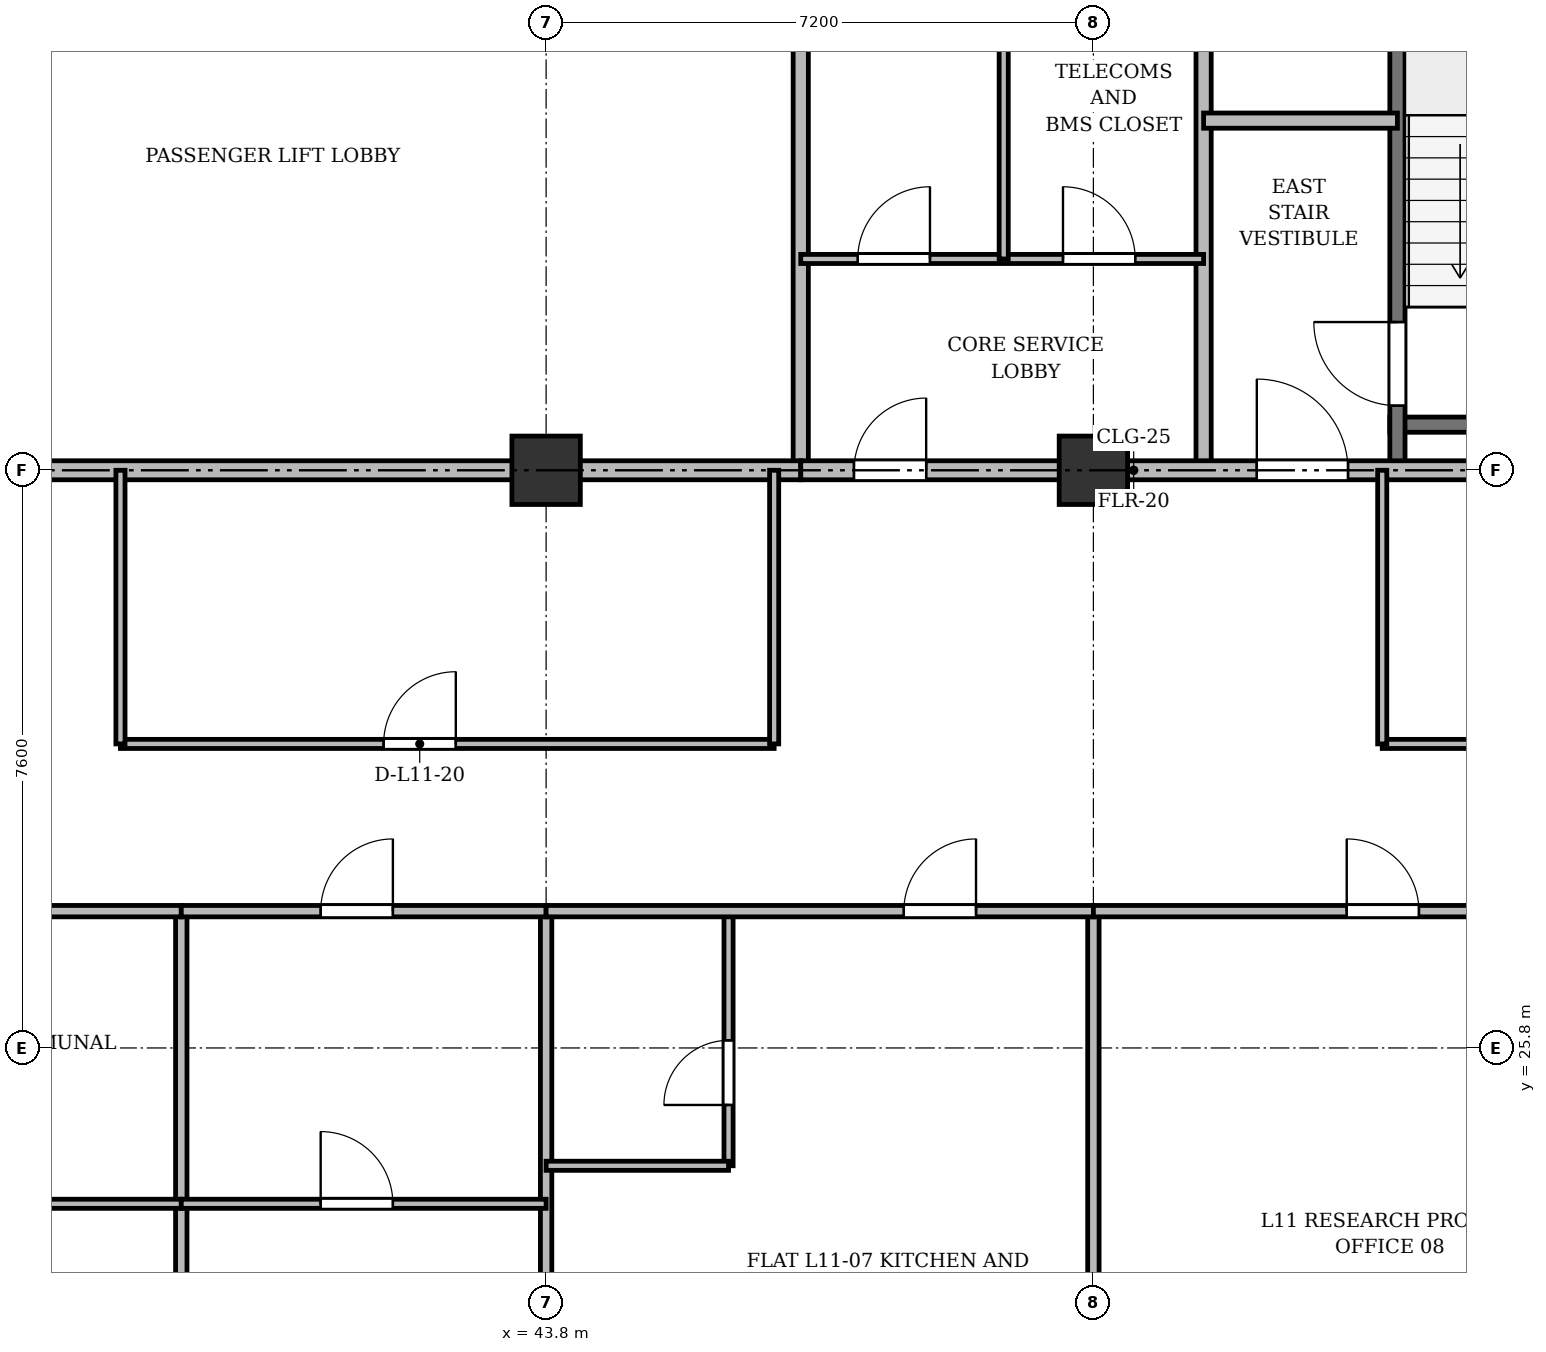
"""IFC4 building model, lengths in metres.
Left out: names, types, materials, properties, quantities, classifications, styles, units other than length and angle.
Written with IfcOpenShell. Run it as: python <this file> out.ifc"""

import sys

from ifc_helpers import new_model, si_unit, direction, frame, frame_2d, origin, origin_2d, place, context, subcontext, project, spatial, rectangle, extrude, source, transform, mapped, element, fill, save


model = new_model("IFC4")
c1 = context("Model", 3, precision=1e-05, world=origin(), true_north=direction((0.0, 1.0)))
c2 = subcontext(c1, "Body", "Model", "MODEL_VIEW")
j1 = project(units=[si_unit("LENGTHUNIT", "METRE"), si_unit("PLANEANGLEUNIT", "RADIAN")], contexts=[c1])
p1 = place(None, origin())
s1 = spatial("IfcSite", under=j1, at=p1, CompositionType="ELEMENT")
p2 = place(p1, origin())
s2 = spatial("IfcBuilding", under=s1, at=p2, CompositionType="ELEMENT")
p3 = place(p2, frame((0.0, 0.0, 45.1)))
s3 = spatial("IfcBuildingStorey", under=s2, at=p3, CompositionType="ELEMENT", Elevation=45.1)
m1 = source(origin(), c2, "Body", "SweptSolid", [
    extrude(rectangle(XDim=0.9, YDim=0.9, at=origin_2d()), origin(), (0.0, 0.0, 1.0), 3.6),
])
for number, where, z_axis, x_axis in (
    (1, (43.8, 33.4, 0.0), (0.0, 0.0, 1.0), (1.0, 0.0, 0.0)),
    (2, (51.0, 33.4, 0.0), (0.0, 0.0, 1.0), (1.0, 0.0, 0.0)),
):
    element("IfcColumn", number, at=place(p3, frame(where, z_axis=z_axis, x_axis=x_axis)), inside=s3, PredefinedType="COLUMN", context=c2, shape_type="MappedRepresentation", body=[
        mapped(m1, transform((0.0, 0.0, 0.0), x_axis=(1.0, 0.0, 0.0), y_axis=(0.0, 1.0, 0.0), z_axis=(0.0, 0.0, 1.0), scale=1.0)),
    ])
p4 = place(p3, frame((54.9, 34.0, 0.0), z_axis=(0.0, 0.0, 1.0), x_axis=(1.0, 0.0, 0.0)))
e3 = element("IfcWall", 3, at=p4, inside=s3, PredefinedType="SHEAR", context=c2, shape_type="SweptSolid", body=[
    extrude(rectangle(XDim=3.4, YDim=0.2, at=frame_2d((1.7, 0.0))), origin(), (0.0, 0.0, 1.0), 3.34),
])
p5 = place(p3, frame((55.0, 33.4, 0.0), z_axis=(0.0, 0.0, 1.0), x_axis=(0.0, 1.0, 0.0)))
e4 = element("IfcWall", 4, at=p5, inside=s3, PredefinedType="SHEAR", context=c2, shape_type="SweptSolid", body=[
    extrude(rectangle(XDim=11.1, YDim=0.2, at=frame_2d((5.55, 0.0))), origin(), (0.0, 0.0, 1.0), 3.34),
])
p6 = place(p5, frame((0.85, 0.0, 0.0)))
e5 = element("IfcOpeningElement", 5, at=p6, cuts=e4, PredefinedType="OPENING", context=c2, shape_type="SweptSolid", body=[
    extrude(rectangle(XDim=1.1, YDim=2.15, at=frame_2d((0.55, 1.075))), frame((0.0, 0.11, 0.0), z_axis=(0.0, -1.0, 0.0), x_axis=(1.0, 0.0, 0.0)), (0.0, 0.0, 1.0), 0.22),
])
p7 = place(p3, frame((47.15, 33.4, 0.0), z_axis=(0.0, 0.0, 1.0), x_axis=(0.0, 1.0, 0.0)))
e6 = element("IfcWall", 6, at=p7, inside=s3, PredefinedType="SOLIDWALL", context=c2, shape_type="SweptSolid", body=[
    extrude(rectangle(XDim=11.3, YDim=0.2, at=frame_2d((5.65, 0.0))), origin(), (0.0, 0.0, 1.0), 2.69),
])
p8 = place(p3, frame((26.3, 33.4, 0.0), z_axis=(0.0, 0.0, 1.0), x_axis=(1.0, 0.0, 0.0)))
e7 = element("IfcWall", 7, at=p8, inside=s3, PredefinedType="PARTITIONING", context=c2, shape_type="SweptSolid", body=[
    extrude(rectangle(XDim=20.85, YDim=0.25, at=frame_2d((10.425, 0.0))), origin(), (0.0, 0.0, 1.0), 2.69),
])
p9 = place(p8, frame((9.2, 0.0, 0.0)))
e8 = element("IfcOpeningElement", 8, at=p9, cuts=e7, PredefinedType="OPENING", context=c2, shape_type="SweptSolid", body=[
    extrude(rectangle(XDim=1.6, YDim=2.2, at=frame_2d((0.8, 1.1))), frame((0.0, 0.135, 0.0), z_axis=(0.0, -1.0, 0.0), x_axis=(1.0, 0.0, 0.0)), (0.0, 0.0, 1.0), 0.27),
])
p10 = place(p3, frame((52.45, 33.4, 0.0), z_axis=(0.0, 0.0, 1.0), x_axis=(0.0, 1.0, 0.0)))
e9 = element("IfcWall", 9, at=p10, inside=s3, PredefinedType="PARTITIONING", context=c2, shape_type="SweptSolid", body=[
    extrude(rectangle(XDim=8.65, YDim=0.2, at=frame_2d((4.325, 0.0))), origin(), (0.0, 0.0, 1.0), 2.69),
])
p11 = place(p10, frame((6.2, 0.0, 0.0)))
e10 = element("IfcOpeningElement", 10, at=p11, cuts=e9, PredefinedType="OPENING", context=c2, shape_type="SweptSolid", body=[
    extrude(rectangle(XDim=0.95, YDim=2.15, at=frame_2d((0.475, 1.075))), frame((0.0, 0.11, 0.0), z_axis=(0.0, -1.0, 0.0), x_axis=(1.0, 0.0, 0.0)), (0.0, 0.0, 1.0), 0.22),
])
p12 = place(p3, frame((52.45, 38.0, 0.0), z_axis=(0.0, 0.0, 1.0), x_axis=(1.0, 0.0, 0.0)))
e11 = element("IfcWall", 11, at=p12, inside=s3, PredefinedType="PARTITIONING", context=c2, shape_type="SweptSolid", body=[
    extrude(rectangle(XDim=2.55, YDim=0.2, at=frame_2d((1.275, 0.0))), origin(), (0.0, 0.0, 1.0), 3.34),
])
p13 = place(p3, frame((47.15, 36.18, 0.0), z_axis=(0.0, 0.0, 1.0), x_axis=(1.0, 0.0, 0.0)))
e12 = element("IfcWall", 12, at=p13, inside=s3, PredefinedType="PARTITIONING", context=c2, shape_type="SweptSolid", body=[
    extrude(rectangle(XDim=5.3, YDim=0.12, at=frame_2d((2.65, 0.0))), origin(), (0.0, 0.0, 1.0), 2.752),
])
p14 = place(p13, frame((0.75, 0.0, 0.0)))
e13 = element("IfcOpeningElement", 13, at=p14, cuts=e12, PredefinedType="OPENING", context=c2, shape_type="SweptSolid", body=[
    extrude(rectangle(XDim=0.95, YDim=2.15, at=frame_2d((0.475, 1.075))), frame((0.0, 0.07, 0.0), z_axis=(0.0, -1.0, 0.0), x_axis=(1.0, 0.0, 0.0)), (0.0, 0.0, 1.0), 0.14),
])
p15 = place(p13, frame((3.45, 0.0, 0.0)))
e14 = element("IfcOpeningElement", 14, at=p15, cuts=e12, PredefinedType="OPENING", context=c2, shape_type="SweptSolid", body=[
    extrude(rectangle(XDim=0.95, YDim=2.15, at=frame_2d((0.475, 1.075))), frame((0.0, 0.07, 0.0), z_axis=(0.0, -1.0, 0.0), x_axis=(1.0, 0.0, 0.0)), (0.0, 0.0, 1.0), 0.14),
])
p16 = place(p3, frame((49.82, 36.18, 0.0), z_axis=(0.0, 0.0, 1.0), x_axis=(0.0, 1.0, 0.0)))
e15 = element("IfcWall", 15, at=p16, inside=s3, PredefinedType="PARTITIONING", context=c2, shape_type="SweptSolid", body=[
    extrude(rectangle(XDim=5.82, YDim=0.12, at=frame_2d((2.91, 0.0))), origin(), (0.0, 0.0, 1.0), 3.34),
])
p17 = place(p3, frame((47.15, 33.4, 0.0), z_axis=(0.0, 0.0, 1.0), x_axis=(1.0, 0.0, 0.0)))
e16 = element("IfcWall", 16, at=p17, inside=s3, PredefinedType="PARTITIONING", context=c2, shape_type="SweptSolid", body=[
    extrude(rectangle(XDim=11.15, YDim=0.25, at=frame_2d((5.575, 0.0))), origin(), (0.0, 0.0, 1.0), 2.69),
])
p18 = place(p17, frame((0.7, 0.0, 0.0)))
e17 = element("IfcOpeningElement", 17, at=p18, cuts=e16, PredefinedType="OPENING", context=c2, shape_type="SweptSolid", body=[
    extrude(rectangle(XDim=0.95, YDim=2.15, at=frame_2d((0.475, 1.075))), frame((0.0, 0.135, 0.0), z_axis=(0.0, -1.0, 0.0), x_axis=(1.0, 0.0, 0.0)), (0.0, 0.0, 1.0), 0.27),
])
p19 = place(p17, frame((6.0, 0.0, 0.0)))
e18 = element("IfcOpeningElement", 18, at=p19, cuts=e16, PredefinedType="OPENING", context=c2, shape_type="SweptSolid", body=[
    extrude(rectangle(XDim=1.2, YDim=2.15, at=frame_2d((0.6, 1.075))), frame((0.0, 0.135, 0.0), z_axis=(0.0, -1.0, 0.0), x_axis=(1.0, 0.0, 0.0)), (0.0, 0.0, 1.0), 0.27),
])
p20 = place(p3, frame((38.2, 29.8, 0.0), z_axis=(0.0, 0.0, 1.0), x_axis=(1.0, 0.0, 0.0)))
e19 = element("IfcWall", 19, at=p20, inside=s3, PredefinedType="PARTITIONING", context=c2, shape_type="SweptSolid", body=[
    extrude(rectangle(XDim=8.6, YDim=0.12, at=frame_2d((4.3, 0.0))), origin(), (0.0, 0.0, 1.0), 2.752),
])
p21 = place(p20, frame((3.462, 0.0, 0.0)))
e20 = element("IfcOpeningElement", 20, at=p21, cuts=e19, PredefinedType="OPENING", context=c2, shape_type="SweptSolid", body=[
    extrude(rectangle(XDim=0.95, YDim=2.15, at=frame_2d((0.475, 1.075))), frame((0.0, 0.07, 0.0), z_axis=(0.0, -1.0, 0.0), x_axis=(1.0, 0.0, 0.0)), (0.0, 0.0, 1.0), 0.14),
])
p22 = place(p3, frame((54.8, 29.8, 0.0), z_axis=(0.0, 0.0, 1.0), x_axis=(1.0, 0.0, 0.0)))
e21 = element("IfcWall", 21, at=p22, inside=s3, PredefinedType="PARTITIONING", context=c2, shape_type="SweptSolid", body=[
    extrude(rectangle(XDim=14.85, YDim=0.12, at=frame_2d((7.425, 0.0))), origin(), (0.0, 0.0, 1.0), 2.752),
])
p23 = place(p22, frame((2.5, 0.0, 0.0)))
e22 = element("IfcOpeningElement", 22, at=p23, cuts=e21, PredefinedType="OPENING", context=c2, shape_type="SweptSolid", body=[
    extrude(rectangle(XDim=0.95, YDim=2.15, at=frame_2d((0.475, 1.075))), frame((0.0, 0.07, 0.0), z_axis=(0.0, -1.0, 0.0), x_axis=(1.0, 0.0, 0.0)), (0.0, 0.0, 1.0), 0.14),
])
p24 = place(p22, frame((9.2, 0.0, 0.0)))
e23 = element("IfcOpeningElement", 23, at=p24, cuts=e21, PredefinedType="OPENING", context=c2, shape_type="SweptSolid", body=[
    extrude(rectangle(XDim=0.95, YDim=2.15, at=frame_2d((0.475, 1.075))), frame((0.0, 0.07, 0.0), z_axis=(0.0, -1.0, 0.0), x_axis=(1.0, 0.0, 0.0)), (0.0, 0.0, 1.0), 0.14),
])
for number, where, z_axis, x_axis in (
    (24, (38.2, 29.8, 0.0), (0.0, 0.0, 1.0), (0.0, 1.0, 0.0)),
    (25, (46.8, 29.8, 0.0), (0.0, 0.0, 1.0), (0.0, 1.0, 0.0)),
    (26, (54.8, 29.8, 0.0), (0.0, 0.0, 1.0), (0.0, 1.0, 0.0)),
):
    element("IfcWall", number, at=place(p3, frame(where, z_axis=z_axis, x_axis=x_axis)), inside=s3, PredefinedType="PARTITIONING", context=c2, shape_type="SweptSolid", body=[
        extrude(rectangle(XDim=3.6, YDim=0.12, at=frame_2d((1.8, 0.0))), origin(), (0.0, 0.0, 1.0), 2.69),
    ])
p25 = place(p3, frame((39.0, 3.145, 0.0), z_axis=(0.0, 0.0, 1.0), x_axis=(0.0, 1.0, 0.0)))
e27 = element("IfcWall", 27, at=p25, inside=s3, PredefinedType="PARTITIONING", context=c2, shape_type="SweptSolid", body=[
    extrude(rectangle(XDim=24.455, YDim=0.15, at=frame_2d((12.228, 0.0))), origin(), (0.0, 0.0, 1.0), 2.69),
])
for number, where, z_axis, x_axis in (
    (28, (43.8, 3.145, 0.0), (0.0, 0.0, 1.0), (0.0, 1.0, 0.0)),
    (29, (51.0, 3.145, 0.0), (0.0, 0.0, 1.0), (0.0, 1.0, 0.0)),
):
    element("IfcWall", number, at=place(p3, frame(where, z_axis=z_axis, x_axis=x_axis)), inside=s3, PredefinedType="PARTITIONING", context=c2, shape_type="SweptSolid", body=[
        extrude(rectangle(XDim=24.455, YDim=0.15, at=frame_2d((12.228, 0.0))), origin(), (0.0, 0.0, 1.0), 2.752),
    ])
p26 = place(p3, frame((30.6, 27.6, 0.0), z_axis=(0.0, 0.0, 1.0), x_axis=(1.0, 0.0, 0.0)))
e30 = element("IfcWall", 30, at=p26, inside=s3, PredefinedType="PARTITIONING", context=c2, shape_type="SweptSolid", body=[
    extrude(rectangle(XDim=8.4, YDim=0.15, at=frame_2d((4.2, 0.0))), origin(), (0.0, 0.0, 1.0), 2.752),
])
p27 = place(p26, frame((3.635, 0.0, 0.0)))
e31 = element("IfcOpeningElement", 31, at=p27, cuts=e30, PredefinedType="OPENING", context=c2, shape_type="SweptSolid", body=[
    extrude(rectangle(XDim=0.95, YDim=2.15, at=frame_2d((0.475, 1.075))), frame((0.0, 0.085, 0.0), z_axis=(0.0, -1.0, 0.0), x_axis=(1.0, 0.0, 0.0)), (0.0, 0.0, 1.0), 0.17),
])
p28 = place(p3, frame((30.6, 23.75, 0.0), z_axis=(0.0, 0.0, 1.0), x_axis=(1.0, 0.0, 0.0)))
e32 = element("IfcWall", 32, at=p28, inside=s3, PredefinedType="PARTITIONING", context=c2, shape_type="SweptSolid", body=[
    extrude(rectangle(XDim=8.4, YDim=0.12, at=frame_2d((4.2, 0.0))), origin(), (0.0, 0.0, 1.0), 2.752),
])
p29 = place(p28, frame((3.635, 0.0, 0.0)))
e33 = element("IfcOpeningElement", 33, at=p29, cuts=e32, PredefinedType="OPENING", context=c2, shape_type="SweptSolid", body=[
    extrude(rectangle(XDim=0.95, YDim=2.15, at=frame_2d((0.475, 1.075))), frame((0.0, 0.07, 0.0), z_axis=(0.0, -1.0, 0.0), x_axis=(1.0, 0.0, 0.0)), (0.0, 0.0, 1.0), 0.14),
])
p30 = place(p3, frame((39.0, 27.6, 0.0), z_axis=(0.0, 0.0, 1.0), x_axis=(1.0, 0.0, 0.0)))
e34 = element("IfcWall", 34, at=p30, inside=s3, PredefinedType="PARTITIONING", context=c2, shape_type="SweptSolid", body=[
    extrude(rectangle(XDim=4.8, YDim=0.15, at=frame_2d((2.4, 0.0))), origin(), (0.0, 0.0, 1.0), 2.752),
])
p31 = place(p30, frame((1.834, 0.0, 0.0)))
e35 = element("IfcOpeningElement", 35, at=p31, cuts=e34, PredefinedType="OPENING", context=c2, shape_type="SweptSolid", body=[
    extrude(rectangle(XDim=0.95, YDim=2.15, at=frame_2d((0.475, 1.075))), frame((0.0, 0.085, 0.0), z_axis=(0.0, -1.0, 0.0), x_axis=(1.0, 0.0, 0.0)), (0.0, 0.0, 1.0), 0.17),
])
p32 = place(p3, frame((39.0, 23.75, 0.0), z_axis=(0.0, 0.0, 1.0), x_axis=(1.0, 0.0, 0.0)))
e36 = element("IfcWall", 36, at=p32, inside=s3, PredefinedType="PARTITIONING", context=c2, shape_type="SweptSolid", body=[
    extrude(rectangle(XDim=4.8, YDim=0.12, at=frame_2d((2.4, 0.0))), origin(), (0.0, 0.0, 1.0), 2.752),
])
p33 = place(p32, frame((1.834, 0.0, 0.0)))
e37 = element("IfcOpeningElement", 37, at=p33, cuts=e36, PredefinedType="OPENING", context=c2, shape_type="SweptSolid", body=[
    extrude(rectangle(XDim=0.95, YDim=2.15, at=frame_2d((0.475, 1.075))), frame((0.0, 0.07, 0.0), z_axis=(0.0, -1.0, 0.0), x_axis=(1.0, 0.0, 0.0)), (0.0, 0.0, 1.0), 0.14),
])
p34 = place(p3, frame((46.2, 24.25, 0.0), z_axis=(0.0, 0.0, 1.0), x_axis=(0.0, 1.0, 0.0)))
e38 = element("IfcWall", 38, at=p34, inside=s3, PredefinedType="PARTITIONING", context=c2, shape_type="SweptSolid", body=[
    extrude(rectangle(XDim=3.35, YDim=0.12, at=frame_2d((1.675, 0.0))), origin(), (0.0, 0.0, 1.0), 2.94),
])
p35 = place(p34, frame((0.8, 0.0, 0.0)))
e39 = element("IfcOpeningElement", 39, at=p35, cuts=e38, PredefinedType="OPENING", context=c2, shape_type="SweptSolid", body=[
    extrude(rectangle(XDim=0.85, YDim=2.1, at=frame_2d((0.425, 1.05))), frame((0.0, 0.07, 0.0), z_axis=(0.0, -1.0, 0.0), x_axis=(1.0, 0.0, 0.0)), (0.0, 0.0, 1.0), 0.14),
])
p36 = place(p3, frame((43.8, 24.25, 0.0), z_axis=(0.0, 0.0, 1.0), x_axis=(1.0, 0.0, 0.0)))
e40 = element("IfcWall", 40, at=p36, inside=s3, PredefinedType="PARTITIONING", context=c2, shape_type="SweptSolid", body=[
    extrude(rectangle(XDim=2.4, YDim=0.12, at=frame_2d((1.2, 0.0))), origin(), (0.0, 0.0, 1.0), 2.752),
])
p37 = place(p3, frame((43.8, 27.6, 0.0), z_axis=(0.0, 0.0, 1.0), x_axis=(1.0, 0.0, 0.0)))
e41 = element("IfcWall", 41, at=p37, inside=s3, PredefinedType="PARTITIONING", context=c2, shape_type="SweptSolid", body=[
    extrude(rectangle(XDim=7.2, YDim=0.15, at=frame_2d((3.6, 0.0))), origin(), (0.0, 0.0, 1.0), 2.752),
])
p38 = place(p37, frame((4.706, 0.0, 0.0)))
e42 = element("IfcOpeningElement", 42, at=p38, cuts=e41, PredefinedType="OPENING", context=c2, shape_type="SweptSolid", body=[
    extrude(rectangle(XDim=0.95, YDim=2.15, at=frame_2d((0.475, 1.075))), frame((0.0, 0.085, 0.0), z_axis=(0.0, -1.0, 0.0), x_axis=(1.0, 0.0, 0.0)), (0.0, 0.0, 1.0), 0.17),
])
p39 = place(p3, frame((51.0, 27.6, 0.0), z_axis=(0.0, 0.0, 1.0), x_axis=(1.0, 0.0, 0.0)))
e43 = element("IfcWall", 43, at=p39, inside=s3, PredefinedType="PARTITIONING", context=c2, shape_type="SweptSolid", body=[
    extrude(rectangle(XDim=7.8, YDim=0.15, at=frame_2d((3.9, 0.0))), origin(), (0.0, 0.0, 1.0), 2.752),
])
p40 = place(p39, frame((3.333, 0.0, 0.0)))
e44 = element("IfcOpeningElement", 44, at=p40, cuts=e43, PredefinedType="OPENING", context=c2, shape_type="SweptSolid", body=[
    extrude(rectangle(XDim=0.95, YDim=2.15, at=frame_2d((0.475, 1.075))), frame((0.0, 0.085, 0.0), z_axis=(0.0, -1.0, 0.0), x_axis=(1.0, 0.0, 0.0)), (0.0, 0.0, 1.0), 0.17),
])
m2 = source(origin(), c2, "Body", "SweptSolid", [
    extrude(rectangle(XDim=1.1, YDim=2.15, at=frame_2d((0.55, 1.075))), frame((0.0, 0.025, 0.0), z_axis=(0.0, -1.0, 0.0), x_axis=(1.0, 0.0, 0.0)), (0.0, 0.0, 1.0), 0.05),
])
p41 = place(p6, origin())
e45 = element("IfcDoor", 45, at=p41, inside=s3, OperationType="SINGLE_SWING_RIGHT", PredefinedType="DOOR", context=c2, shape_type="MappedRepresentation", body=[
    mapped(m2, transform((0.0, 0.0, 0.0), x_axis=(1.0, 0.0, 0.0), y_axis=(0.0, 1.0, 0.0), z_axis=(0.0, 0.0, 1.0), scale=1.0)),
])
fill(e5, e45)
m3 = source(origin(), c2, "Body", "SweptSolid", [
    extrude(rectangle(XDim=0.95, YDim=2.15, at=frame_2d((0.475, 1.075))), frame((0.0, 0.025, 0.0), z_axis=(0.0, -1.0, 0.0), x_axis=(1.0, 0.0, 0.0)), (0.0, 0.0, 1.0), 0.05),
])
p42 = place(p14, origin())
e46 = element("IfcDoor", 46, at=p42, inside=s3, OperationType="SINGLE_SWING_RIGHT", PredefinedType="DOOR", context=c2, shape_type="MappedRepresentation", body=[
    mapped(m3, transform((0.0, 0.0, 0.0), x_axis=(1.0, 0.0, 0.0), y_axis=(0.0, 1.0, 0.0), z_axis=(0.0, 0.0, 1.0), scale=1.0)),
])
fill(e13, e46)
p43 = place(p15, origin())
e47 = element("IfcDoor", 47, at=p43, inside=s3, OperationType="SINGLE_SWING_LEFT", PredefinedType="DOOR", context=c2, shape_type="MappedRepresentation", body=[
    mapped(m3, transform((0.0, 0.0, 0.0), x_axis=(1.0, 0.0, 0.0), y_axis=(0.0, 1.0, 0.0), z_axis=(0.0, 0.0, 1.0), scale=1.0)),
])
fill(e14, e47)
p44 = place(p18, origin())
e48 = element("IfcDoor", 48, at=p44, inside=s3, OperationType="SINGLE_SWING_RIGHT", PredefinedType="DOOR", context=c2, shape_type="MappedRepresentation", body=[
    mapped(m3, transform((0.0, 0.0, 0.0), x_axis=(1.0, 0.0, 0.0), y_axis=(0.0, 1.0, 0.0), z_axis=(0.0, 0.0, 1.0), scale=1.0)),
])
fill(e17, e48)
m4 = source(origin(), c2, "Body", "SweptSolid", [
    extrude(rectangle(XDim=1.2, YDim=2.15, at=frame_2d((0.6, 1.075))), frame((0.0, 0.025, 0.0), z_axis=(0.0, -1.0, 0.0), x_axis=(1.0, 0.0, 0.0)), (0.0, 0.0, 1.0), 0.05),
])
p45 = place(p19, origin())
e49 = element("IfcDoor", 49, at=p45, inside=s3, OperationType="SINGLE_SWING_LEFT", PredefinedType="DOOR", context=c2, shape_type="MappedRepresentation", body=[
    mapped(m4, transform((0.0, 0.0, 0.0), x_axis=(1.0, 0.0, 0.0), y_axis=(0.0, 1.0, 0.0), z_axis=(0.0, 0.0, 1.0), scale=1.0)),
])
fill(e18, e49)
p46 = place(p21, origin())
e50 = element("IfcDoor", 50, at=p46, inside=s3, OperationType="SINGLE_SWING_RIGHT", PredefinedType="DOOR", context=c2, shape_type="MappedRepresentation", body=[
    mapped(m3, transform((0.0, 0.0, 0.0), x_axis=(1.0, 0.0, 0.0), y_axis=(0.0, 1.0, 0.0), z_axis=(0.0, 0.0, 1.0), scale=1.0)),
])
fill(e20, e50)
p47 = place(p31, origin())
e51 = element("IfcDoor", 51, at=p47, inside=s3, OperationType="SINGLE_SWING_RIGHT", PredefinedType="DOOR", context=c2, shape_type="MappedRepresentation", body=[
    mapped(m3, transform((0.0, 0.0, 0.0), x_axis=(1.0, 0.0, 0.0), y_axis=(0.0, 1.0, 0.0), z_axis=(0.0, 0.0, 1.0), scale=1.0)),
])
fill(e35, e51)
p48 = place(p33, origin())
e52 = element("IfcDoor", 52, at=p48, inside=s3, OperationType="SINGLE_SWING_LEFT", PredefinedType="DOOR", context=c2, shape_type="MappedRepresentation", body=[
    mapped(m3, transform((0.0, 0.0, 0.0), x_axis=(1.0, 0.0, 0.0), y_axis=(0.0, 1.0, 0.0), z_axis=(0.0, 0.0, 1.0), scale=1.0)),
])
fill(e37, e52)
m5 = source(origin(), c2, "Body", "SweptSolid", [
    extrude(rectangle(XDim=0.85, YDim=2.1, at=frame_2d((0.425, 1.05))), frame((0.0, 0.025, 0.0), z_axis=(0.0, -1.0, 0.0), x_axis=(1.0, 0.0, 0.0)), (0.0, 0.0, 1.0), 0.05),
])
p49 = place(p35, origin())
e53 = element("IfcDoor", 53, at=p49, inside=s3, OperationType="SINGLE_SWING_LEFT", PredefinedType="DOOR", context=c2, shape_type="MappedRepresentation", body=[
    mapped(m5, transform((0.0, 0.0, 0.0), x_axis=(1.0, 0.0, 0.0), y_axis=(0.0, 1.0, 0.0), z_axis=(0.0, 0.0, 1.0), scale=1.0)),
])
fill(e39, e53)
p50 = place(p38, origin())
e54 = element("IfcDoor", 54, at=p50, inside=s3, OperationType="SINGLE_SWING_RIGHT", PredefinedType="DOOR", context=c2, shape_type="MappedRepresentation", body=[
    mapped(m3, transform((0.0, 0.0, 0.0), x_axis=(1.0, 0.0, 0.0), y_axis=(0.0, 1.0, 0.0), z_axis=(0.0, 0.0, 1.0), scale=1.0)),
])
fill(e42, e54)
p51 = place(p40, origin())
e55 = element("IfcDoor", 55, at=p51, inside=s3, OperationType="SINGLE_SWING_LEFT", PredefinedType="DOOR", context=c2, shape_type="MappedRepresentation", body=[
    mapped(m3, transform((0.0, 0.0, 0.0), x_axis=(1.0, 0.0, 0.0), y_axis=(0.0, 1.0, 0.0), z_axis=(0.0, 0.0, 1.0), scale=1.0)),
])
fill(e44, e55)
save(model, sys.argv[1])
